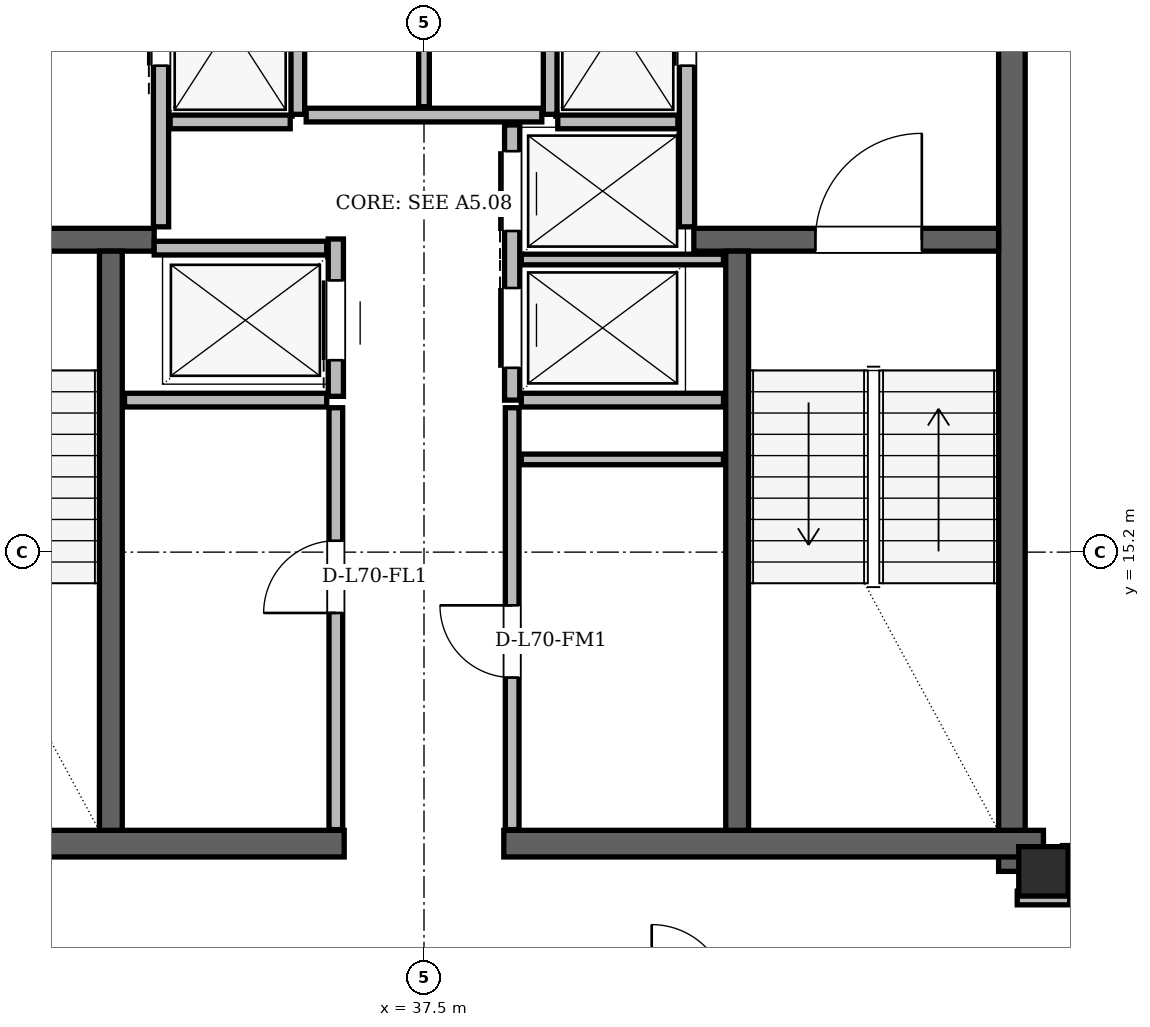
"""IFC4 building model, lengths in metres.
Left out: names, types, materials, properties, quantities, classifications, styles, units other than length and angle.
Written with IfcOpenShell. Run it as: python <this file> out.ifc"""

import sys

from ifc_helpers import new_model, si_unit, direction, frame, frame_2d, origin, origin_2d, place, context, subcontext, project, spatial, rectangle, hollow_rectangle, extrude, element, fill, save


model = new_model("IFC4")
c1 = context("Model", 3, precision=1e-05, world=origin(), true_north=direction((0.0, 1.0)))
c2 = subcontext(c1, "Body", "Model", "MODEL_VIEW")
j1 = project(units=[si_unit("LENGTHUNIT", "METRE"), si_unit("PLANEANGLEUNIT", "RADIAN")], contexts=[c1])
p1 = place(None, origin())
s1 = spatial("IfcSite", under=j1, at=p1, CompositionType="ELEMENT")
p2 = place(p1, origin())
s2 = spatial("IfcBuilding", under=s1, at=p2, CompositionType="ELEMENT")
p3 = place(p2, frame((0.0, 0.0, 265.5)))
s3 = spatial("IfcBuildingStorey", under=s2, at=p3, CompositionType="ELEMENT", Elevation=265.5)
p4 = place(p3, frame((45.65, 11.0, 0.0), z_axis=(0.0, 0.0, 1.0), x_axis=(1.0, 0.0, 0.0)))
e1 = element("IfcColumn", 1, at=p4, inside=s3, PredefinedType="COLUMN", context=c2, shape_type="SweptSolid", body=[
    extrude(hollow_rectangle(XDim=0.65, YDim=0.65, WallThickness=0.05, at=origin_2d()), origin(), (0.0, 0.0, 1.0), 3.9),
])
p5 = place(p3, frame((45.235, 11.0, 0.0), z_axis=(0.0, 0.0, 1.0), x_axis=(0.0, 1.0, 0.0)))
e2 = element("IfcWall", 2, at=p5, inside=s3, PredefinedType="SHEAR", context=c2, shape_type="SweptSolid", body=[
    extrude(rectangle(XDim=13.3, YDim=0.35, at=frame_2d((6.65, 0.0))), origin(), (0.0, 0.0, 1.0), 3.68),
])
for number, where, z_axis, x_axis in (
    (3, (29.35, 11.365, 0.0), (0.0, 0.0, 1.0), (1.0, 0.0, 0.0)),
    (4, (38.55, 11.365, 0.0), (0.0, 0.0, 1.0), (1.0, 0.0, 0.0)),
):
    element("IfcWall", number, at=place(p3, frame(where, z_axis=z_axis, x_axis=x_axis)), inside=s3, PredefinedType="SHEAR", context=c2, shape_type="SweptSolid", body=[
        extrude(rectangle(XDim=7.1, YDim=0.35, at=frame_2d((3.55, 0.0))), origin(), (0.0, 0.0, 1.0), 3.68),
    ])
p6 = place(p3, frame((29.94, 19.31, 0.0), z_axis=(0.0, 0.0, 1.0), x_axis=(1.0, 0.0, 0.0)))
e5 = element("IfcWall", 5, at=p6, inside=s3, PredefinedType="SHEAR", context=c2, shape_type="SweptSolid", body=[
    extrude(rectangle(XDim=4.01, YDim=0.3, at=frame_2d((2.005, 0.0))), origin(), (0.0, 0.0, 1.0), 3.68),
])
p7 = place(p6, frame((1.01, 0.0, 0.0)))
e6 = element("IfcOpeningElement", 6, at=p7, cuts=e5, PredefinedType="OPENING", context=c2, shape_type="SweptSolid", body=[
    extrude(rectangle(XDim=1.4, YDim=2.2, at=frame_2d((0.7, 1.1))), frame((0.0, 0.15, 0.0), z_axis=(0.0, -1.0, 0.0), x_axis=(1.0, 0.0, 0.0)), (0.0, 0.0, 1.0), 0.3),
])
p8 = place(p3, frame((41.05, 19.31, 0.0), z_axis=(0.0, 0.0, 1.0), x_axis=(1.0, 0.0, 0.0)))
e7 = element("IfcWall", 7, at=p8, inside=s3, PredefinedType="SHEAR", context=c2, shape_type="SweptSolid", body=[
    extrude(rectangle(XDim=4.01, YDim=0.3, at=frame_2d((2.005, 0.0))), origin(), (0.0, 0.0, 1.0), 3.68),
])
p9 = place(p8, frame((1.6, 0.0, 0.0)))
e8 = element("IfcOpeningElement", 8, at=p9, cuts=e7, PredefinedType="OPENING", context=c2, shape_type="SweptSolid", body=[
    extrude(rectangle(XDim=1.4, YDim=2.2, at=frame_2d((0.7, 1.1))), frame((0.0, 0.15, 0.0), z_axis=(0.0, -1.0, 0.0), x_axis=(1.0, 0.0, 0.0)), (0.0, 0.0, 1.0), 0.3),
])
for number, where, z_axis, x_axis in (
    (9, (33.38, 11.54, 0.0), (0.0, 0.0, 1.0), (0.0, 1.0, 0.0)),
    (10, (41.62, 11.54, 0.0), (0.0, 0.0, 1.0), (0.0, 1.0, 0.0)),
):
    element("IfcWall", number, at=place(p3, frame(where, z_axis=z_axis, x_axis=x_axis)), inside=s3, PredefinedType="SHEAR", context=c2, shape_type="SweptSolid", body=[
        extrude(rectangle(XDim=7.62, YDim=0.3, at=frame_2d((3.81, 0.0))), origin(), (0.0, 0.0, 1.0), 3.68),
    ])
p10 = place(p3, frame((35.012, 43.042, 0.0), z_axis=(0.0, 0.0, 1.0), x_axis=(-0.49999932964, -0.866025790817, 0.0)))
e11 = element("IfcWall", 11, at=p10, inside=s3, PredefinedType="SOLIDWALL", context=c2, shape_type="SweptSolid", body=[
    extrude(rectangle(XDim=37.248, YDim=0.29, at=frame_2d((18.624, 0.0))), origin(), (0.0, 0.0, 1.0), 3.058),
])
p11 = place(p10, frame((3.639, 0.0, 0.0)))
e12 = element("IfcOpeningElement", 12, at=p11, cuts=e11, PredefinedType="OPENING", context=c2, shape_type="SweptSolid", body=[
    extrude(rectangle(XDim=1.5, YDim=2.2, at=frame_2d((0.75, 1.1))), frame((0.0, 0.145, 0.0), z_axis=(0.0, -1.0, 0.0), x_axis=(1.0, 0.0, 0.0)), (0.0, 0.0, 1.0), 0.29),
])
p12 = place(p10, frame((27.504, 0.0, 0.0)))
e13 = element("IfcOpeningElement", 13, at=p12, cuts=e11, PredefinedType="OPENING", context=c2, shape_type="SweptSolid", body=[
    extrude(rectangle(XDim=1.5, YDim=2.2, at=frame_2d((0.75, 1.1))), frame((0.0, 0.145, 0.0), z_axis=(0.0, -1.0, 0.0), x_axis=(1.0, 0.0, 0.0)), (0.0, 0.0, 1.0), 0.29),
])
p13 = place(p10, frame((35.135, 0.0, 0.85)))
e14 = element("IfcOpeningElement", 14, at=p13, cuts=e11, PredefinedType="OPENING", context=c2, shape_type="SweptSolid", body=[
    extrude(rectangle(XDim=1.2, YDim=1.48, at=frame_2d((0.6, 0.74))), frame((0.0, 0.145, 0.0), z_axis=(0.0, -1.0, 0.0), x_axis=(1.0, 0.0, 0.0)), (0.0, 0.0, 1.0), 0.29),
])
p14 = place(p10, frame((32.321, 0.0, 0.85)))
e15 = element("IfcOpeningElement", 15, at=p14, cuts=e11, PredefinedType="OPENING", context=c2, shape_type="SweptSolid", body=[
    extrude(rectangle(XDim=2.0, YDim=1.8, at=frame_2d((1.0, 0.9))), frame((0.0, 0.145, 0.0), z_axis=(0.0, -1.0, 0.0), x_axis=(1.0, 0.0, 0.0)), (0.0, 0.0, 1.0), 0.29),
])
p15 = place(p10, frame((12.691, 0.0, 0.85)))
e16 = element("IfcOpeningElement", 16, at=p15, cuts=e11, PredefinedType="OPENING", context=c2, shape_type="SweptSolid", body=[
    extrude(rectangle(XDim=2.0, YDim=1.8, at=frame_2d((1.0, 0.9))), frame((0.0, 0.145, 0.0), z_axis=(0.0, -1.0, 0.0), x_axis=(1.0, 0.0, 0.0)), (0.0, 0.0, 1.0), 0.29),
])
p16 = place(p10, frame((21.019, 0.0, 0.85)))
e17 = element("IfcOpeningElement", 17, at=p16, cuts=e11, PredefinedType="OPENING", context=c2, shape_type="SweptSolid", body=[
    extrude(rectangle(XDim=1.4, YDim=1.6, at=frame_2d((0.7, 0.8))), frame((0.0, 0.145, 0.0), z_axis=(0.0, -1.0, 0.0), x_axis=(1.0, 0.0, 0.0)), (0.0, 0.0, 1.0), 0.29),
])
p17 = place(p10, frame((1.529, 0.0, 0.85)))
e18 = element("IfcOpeningElement", 18, at=p17, cuts=e11, PredefinedType="OPENING", context=c2, shape_type="SweptSolid", body=[
    extrude(rectangle(XDim=1.2, YDim=1.48, at=frame_2d((0.6, 0.74))), frame((0.0, 0.145, 0.0), z_axis=(0.0, -1.0, 0.0), x_axis=(1.0, 0.0, 0.0)), (0.0, 0.0, 1.0), 0.29),
])
p18 = place(p10, frame((7.904, 0.0, 0.85)))
e19 = element("IfcOpeningElement", 19, at=p18, cuts=e11, PredefinedType="OPENING", context=c2, shape_type="SweptSolid", body=[
    extrude(rectangle(XDim=2.0, YDim=1.8, at=frame_2d((1.0, 0.9))), frame((0.0, 0.145, 0.0), z_axis=(0.0, -1.0, 0.0), x_axis=(1.0, 0.0, 0.0)), (0.0, 0.0, 1.0), 0.29),
])
p19 = place(p3, frame((34.04, 19.48, 0.0), z_axis=(0.0, 0.0, 1.0), x_axis=(0.0, 1.0, 0.0)))
e20 = element("IfcWall", 20, at=p19, inside=s3, PredefinedType="PARTITIONING", context=c2, shape_type="SweptSolid", body=[
    extrude(rectangle(XDim=4.5, YDim=0.2, at=frame_2d((2.25, 0.0))), origin(), (0.0, 0.0, 1.0), 3.68),
])
p20 = place(p19, frame((2.12, 0.0, 0.0)))
e21 = element("IfcOpeningElement", 21, at=p20, cuts=e20, PredefinedType="OPENING", context=c2, shape_type="SweptSolid", body=[
    extrude(rectangle(XDim=1.1, YDim=2.2, at=frame_2d((0.55, 1.1))), frame((0.0, 0.1, 0.0), z_axis=(0.0, -1.0, 0.0), x_axis=(1.0, 0.0, 0.0)), (0.0, 0.0, 1.0), 0.2),
])
p21 = place(p3, frame((35.84, 20.96, 0.0), z_axis=(0.0, 0.0, 1.0), x_axis=(0.0, 1.0, 0.0)))
e22 = element("IfcWall", 22, at=p21, inside=s3, PredefinedType="PARTITIONING", context=c2, shape_type="SweptSolid", body=[
    extrude(rectangle(XDim=3.02, YDim=0.18, at=frame_2d((1.51, 0.0))), origin(), (0.0, 0.0, 1.0), 3.68),
])
p22 = place(p3, frame((34.16, 20.86, 0.0), z_axis=(0.0, 0.0, 1.0), x_axis=(1.0, 0.0, 0.0)))
e23 = element("IfcWall", 23, at=p22, inside=s3, PredefinedType="PARTITIONING", context=c2, shape_type="SweptSolid", body=[
    extrude(rectangle(XDim=1.58, YDim=0.18, at=frame_2d((0.79, 0.0))), origin(), (0.0, 0.0, 1.0), 3.68),
])
p23 = place(p3, frame((40.96, 19.48, 0.0), z_axis=(0.0, 0.0, 1.0), x_axis=(0.0, 1.0, 0.0)))
e24 = element("IfcWall", 24, at=p23, inside=s3, PredefinedType="PARTITIONING", context=c2, shape_type="SweptSolid", body=[
    extrude(rectangle(XDim=4.5, YDim=0.2, at=frame_2d((2.25, 0.0))), origin(), (0.0, 0.0, 1.0), 3.68),
])
p24 = place(p23, frame((2.12, 0.0, 0.0)))
e25 = element("IfcOpeningElement", 25, at=p24, cuts=e24, PredefinedType="OPENING", context=c2, shape_type="SweptSolid", body=[
    extrude(rectangle(XDim=1.1, YDim=2.2, at=frame_2d((0.55, 1.1))), frame((0.0, 0.1, 0.0), z_axis=(0.0, -1.0, 0.0), x_axis=(1.0, 0.0, 0.0)), (0.0, 0.0, 1.0), 0.2),
])
p25 = place(p3, frame((39.16, 20.96, 0.0), z_axis=(0.0, 0.0, 1.0), x_axis=(0.0, 1.0, 0.0)))
e26 = element("IfcWall", 26, at=p25, inside=s3, PredefinedType="PARTITIONING", context=c2, shape_type="SweptSolid", body=[
    extrude(rectangle(XDim=3.02, YDim=0.18, at=frame_2d((1.51, 0.0))), origin(), (0.0, 0.0, 1.0), 3.68),
])
p26 = place(p3, frame((39.26, 20.86, 0.0), z_axis=(0.0, 0.0, 1.0), x_axis=(1.0, 0.0, 0.0)))
e27 = element("IfcWall", 27, at=p26, inside=s3, PredefinedType="PARTITIONING", context=c2, shape_type="SweptSolid", body=[
    extrude(rectangle(XDim=1.58, YDim=0.18, at=frame_2d((0.79, 0.0))), origin(), (0.0, 0.0, 1.0), 3.68),
])
p27 = place(p3, frame((36.34, 17.25, 0.0), z_axis=(0.0, 0.0, 1.0), x_axis=(0.0, 1.0, 0.0)))
e28 = element("IfcWall", 28, at=p27, inside=s3, PredefinedType="PARTITIONING", context=c2, shape_type="SweptSolid", body=[
    extrude(rectangle(XDim=2.07, YDim=0.2, at=frame_2d((1.035, 0.0))), origin(), (0.0, 0.0, 1.0), 3.68),
])
p28 = place(p27, frame((0.475, 0.0, 0.0)))
e29 = element("IfcOpeningElement", 29, at=p28, cuts=e28, PredefinedType="OPENING", context=c2, shape_type="SweptSolid", body=[
    extrude(rectangle(XDim=1.05, YDim=2.15, at=frame_2d((0.525, 1.075))), frame((0.0, 0.1, 0.0), z_axis=(0.0, -1.0, 0.0), x_axis=(1.0, 0.0, 0.0)), (0.0, 0.0, 1.0), 0.2),
])
p29 = place(p3, frame((33.95, 19.2, 0.0), z_axis=(0.0, 0.0, 1.0), x_axis=(1.0, 0.0, 0.0)))
e30 = element("IfcWall", 30, at=p29, inside=s3, PredefinedType="PARTITIONING", context=c2, shape_type="SweptSolid", body=[
    extrude(rectangle(XDim=2.27, YDim=0.18, at=frame_2d((1.135, 0.0))), origin(), (0.0, 0.0, 1.0), 3.68),
])
p30 = place(p3, frame((33.56, 17.2, 0.0), z_axis=(0.0, 0.0, 1.0), x_axis=(1.0, 0.0, 0.0)))
e31 = element("IfcWall", 31, at=p30, inside=s3, PredefinedType="PARTITIONING", context=c2, shape_type="SweptSolid", body=[
    extrude(rectangle(XDim=2.66, YDim=0.18, at=frame_2d((1.33, 0.0))), origin(), (0.0, 0.0, 1.0), 3.68),
])
p31 = place(p3, frame((36.34, 11.55, 0.0), z_axis=(0.0, 0.0, 1.0), x_axis=(0.0, 1.0, 0.0)))
e32 = element("IfcWall", 32, at=p31, inside=s3, PredefinedType="PARTITIONING", context=c2, shape_type="SweptSolid", body=[
    extrude(rectangle(XDim=5.55, YDim=0.18, at=frame_2d((2.775, 0.0))), origin(), (0.0, 0.0, 1.0), 3.68),
])
p32 = place(p31, frame((2.85, 0.0, 0.0)))
e33 = element("IfcOpeningElement", 33, at=p32, cuts=e32, PredefinedType="OPENING", context=c2, shape_type="SweptSolid", body=[
    extrude(rectangle(XDim=0.95, YDim=2.1, at=frame_2d((0.475, 1.05))), frame((0.0, 0.09, 0.0), z_axis=(0.0, -1.0, 0.0), x_axis=(1.0, 0.0, 0.0)), (0.0, 0.0, 1.0), 0.18),
])
p33 = place(p3, frame((38.66, 17.2, 0.0), z_axis=(0.0, 0.0, 1.0), x_axis=(0.0, 1.0, 0.0)))
e34 = element("IfcWall", 34, at=p33, inside=s3, PredefinedType="PARTITIONING", context=c2, shape_type="SweptSolid", body=[
    extrude(rectangle(XDim=3.62, YDim=0.2, at=frame_2d((1.81, 0.0))), origin(), (0.0, 0.0, 1.0), 3.68),
])
p34 = place(p33, frame((0.425, 0.0, 0.0)))
e35 = element("IfcOpeningElement", 35, at=p34, cuts=e34, PredefinedType="OPENING", context=c2, shape_type="SweptSolid", body=[
    extrude(rectangle(XDim=1.05, YDim=2.15, at=frame_2d((0.525, 1.075))), frame((0.0, 0.1, 0.0), z_axis=(0.0, -1.0, 0.0), x_axis=(1.0, 0.0, 0.0)), (0.0, 0.0, 1.0), 0.2),
])
p35 = place(p33, frame((2.225, 0.0, 0.0)))
e36 = element("IfcOpeningElement", 36, at=p35, cuts=e34, PredefinedType="OPENING", context=c2, shape_type="SweptSolid", body=[
    extrude(rectangle(XDim=1.05, YDim=2.15, at=frame_2d((0.525, 1.075))), frame((0.0, 0.1, 0.0), z_axis=(0.0, -1.0, 0.0), x_axis=(1.0, 0.0, 0.0)), (0.0, 0.0, 1.0), 0.2),
])
p36 = place(p3, frame((38.78, 17.2, 0.0), z_axis=(0.0, 0.0, 1.0), x_axis=(1.0, 0.0, 0.0)))
e37 = element("IfcWall", 37, at=p36, inside=s3, PredefinedType="PARTITIONING", context=c2, shape_type="SweptSolid", body=[
    extrude(rectangle(XDim=2.66, YDim=0.18, at=frame_2d((1.33, 0.0))), origin(), (0.0, 0.0, 1.0), 3.68),
])
p37 = place(p3, frame((38.78, 19.05, 0.0), z_axis=(0.0, 0.0, 1.0), x_axis=(1.0, 0.0, 0.0)))
e38 = element("IfcWall", 38, at=p37, inside=s3, PredefinedType="PARTITIONING", context=c2, shape_type="SweptSolid", body=[
    extrude(rectangle(XDim=2.66, YDim=0.14, at=frame_2d((1.33, 0.0))), origin(), (0.0, 0.0, 1.0), 3.68),
])
p38 = place(p3, frame((38.66, 11.55, 0.0), z_axis=(0.0, 0.0, 1.0), x_axis=(0.0, 1.0, 0.0)))
e39 = element("IfcWall", 39, at=p38, inside=s3, PredefinedType="PARTITIONING", context=c2, shape_type="SweptSolid", body=[
    extrude(rectangle(XDim=5.55, YDim=0.18, at=frame_2d((2.775, 0.0))), origin(), (0.0, 0.0, 1.0), 3.68),
])
p39 = place(p38, frame((2.0, 0.0, 0.0)))
e40 = element("IfcOpeningElement", 40, at=p39, cuts=e39, PredefinedType="OPENING", context=c2, shape_type="SweptSolid", body=[
    extrude(rectangle(XDim=0.95, YDim=2.1, at=frame_2d((0.475, 1.05))), frame((0.0, 0.09, 0.0), z_axis=(0.0, -1.0, 0.0), x_axis=(1.0, 0.0, 0.0)), (0.0, 0.0, 1.0), 0.18),
])
p40 = place(p3, frame((38.78, 16.42, 0.0), z_axis=(0.0, 0.0, 1.0), x_axis=(1.0, 0.0, 0.0)))
e41 = element("IfcWall", 41, at=p40, inside=s3, PredefinedType="PARTITIONING", context=c2, shape_type="SweptSolid", body=[
    extrude(rectangle(XDim=2.66, YDim=0.14, at=frame_2d((1.33, 0.0))), origin(), (0.0, 0.0, 1.0), 3.68),
])
p41 = place(p3, frame((35.95, 20.95, 0.0), z_axis=(0.0, 0.0, 1.0), x_axis=(1.0, 0.0, 0.0)))
e42 = element("IfcWall", 42, at=p41, inside=s3, PredefinedType="PARTITIONING", context=c2, shape_type="SweptSolid", body=[
    extrude(rectangle(XDim=3.1, YDim=0.18, at=frame_2d((1.55, 0.0))), origin(), (0.0, 0.0, 1.0), 3.68),
])
p42 = place(p3, frame((37.5, 21.06, 0.0), z_axis=(0.0, 0.0, 1.0), x_axis=(0.0, 1.0, 0.0)))
e43 = element("IfcWall", 43, at=p42, inside=s3, PredefinedType="PARTITIONING", context=c2, shape_type="SweptSolid", body=[
    extrude(rectangle(XDim=2.92, YDim=0.14, at=frame_2d((1.46, 0.0))), origin(), (0.0, 0.0, 1.0), 3.68),
])
p43 = place(p3, frame((45.305, 10.65, 0.0), z_axis=(0.0, 0.0, 1.0), x_axis=(1.0, 0.0, 0.0)))
e44 = element("IfcWall", 44, at=p43, inside=s3, PredefinedType="PARTITIONING", context=c2, shape_type="SweptSolid", body=[
    extrude(rectangle(XDim=0.69, YDim=0.18, at=frame_2d((0.345, 0.0))), origin(), (0.0, 0.0, 1.0), 3.68),
])
p44 = place(p3, frame((45.99, 10.95, 0.0), z_axis=(0.0, 0.0, 1.0), x_axis=(0.0, 1.0, 0.0)))
e45 = element("IfcWall", 45, at=p44, inside=s3, PredefinedType="PARTITIONING", context=c2, shape_type="SweptSolid", body=[
    extrude(rectangle(XDim=0.39, YDim=0.18, at=frame_2d((0.195, 0.0))), origin(), (0.0, 0.0, 1.0), 3.68),
])
p45 = place(p32, origin())
e46 = element("IfcDoor", 46, at=p45, inside=s3, OperationType="SINGLE_SWING_LEFT", PredefinedType="DOOR", context=c2, shape_type="SweptSolid", body=[
    extrude(rectangle(XDim=0.95, YDim=2.1, at=frame_2d((0.475, 1.05))), frame((0.0, 0.025, 0.0), z_axis=(0.0, -1.0, 0.0), x_axis=(1.0, 0.0, 0.0)), (0.0, 0.0, 1.0), 0.05),
])
fill(e33, e46)
p46 = place(p39, origin())
e47 = element("IfcDoor", 47, at=p46, inside=s3, OperationType="SINGLE_SWING_RIGHT", PredefinedType="DOOR", context=c2, shape_type="SweptSolid", body=[
    extrude(rectangle(XDim=0.95, YDim=2.1, at=frame_2d((0.475, 1.05))), frame((0.0, 0.025, 0.0), z_axis=(0.0, -1.0, 0.0), x_axis=(1.0, 0.0, 0.0)), (0.0, 0.0, 1.0), 0.05),
])
fill(e40, e47)
p47 = place(p20, origin())
e48 = element("IfcDoor", 48, at=p47, inside=s3, OperationType="SLIDING_TO_LEFT", PredefinedType="DOOR", context=c2, shape_type="SweptSolid", body=[
    extrude(rectangle(XDim=1.1, YDim=2.2, at=frame_2d((0.55, 1.1))), frame((0.0, 0.025, 0.0), z_axis=(0.0, -1.0, 0.0), x_axis=(1.0, 0.0, 0.0)), (0.0, 0.0, 1.0), 0.05),
])
fill(e21, e48)
p48 = place(p24, origin())
e49 = element("IfcDoor", 49, at=p48, inside=s3, OperationType="SLIDING_TO_RIGHT", PredefinedType="DOOR", context=c2, shape_type="SweptSolid", body=[
    extrude(rectangle(XDim=1.1, YDim=2.2, at=frame_2d((0.55, 1.1))), frame((0.0, 0.025, 0.0), z_axis=(0.0, -1.0, 0.0), x_axis=(1.0, 0.0, 0.0)), (0.0, 0.0, 1.0), 0.05),
])
fill(e25, e49)
p49 = place(p28, origin())
e50 = element("IfcDoor", 50, at=p49, inside=s3, OperationType="SLIDING_TO_LEFT", PredefinedType="DOOR", context=c2, shape_type="SweptSolid", body=[
    extrude(rectangle(XDim=1.05, YDim=2.15, at=frame_2d((0.525, 1.075))), frame((0.0, 0.025, 0.0), z_axis=(0.0, -1.0, 0.0), x_axis=(1.0, 0.0, 0.0)), (0.0, 0.0, 1.0), 0.05),
])
fill(e29, e50)
p50 = place(p34, origin())
e51 = element("IfcDoor", 51, at=p50, inside=s3, OperationType="SLIDING_TO_RIGHT", PredefinedType="DOOR", context=c2, shape_type="SweptSolid", body=[
    extrude(rectangle(XDim=1.05, YDim=2.15, at=frame_2d((0.525, 1.075))), frame((0.0, 0.025, 0.0), z_axis=(0.0, -1.0, 0.0), x_axis=(1.0, 0.0, 0.0)), (0.0, 0.0, 1.0), 0.05),
])
fill(e35, e51)
p51 = place(p35, origin())
e52 = element("IfcDoor", 52, at=p51, inside=s3, OperationType="SLIDING_TO_LEFT", PredefinedType="DOOR", context=c2, shape_type="SweptSolid", body=[
    extrude(rectangle(XDim=1.05, YDim=2.15, at=frame_2d((0.525, 1.075))), frame((0.0, 0.025, 0.0), z_axis=(0.0, -1.0, 0.0), x_axis=(1.0, 0.0, 0.0)), (0.0, 0.0, 1.0), 0.05),
])
fill(e36, e52)
p52 = place(p9, origin())
e53 = element("IfcDoor", 53, at=p52, inside=s3, OperationType="SINGLE_SWING_RIGHT", PredefinedType="DOOR", context=c2, shape_type="SweptSolid", body=[
    extrude(rectangle(XDim=1.4, YDim=2.2, at=frame_2d((0.7, 1.1))), frame((0.0, 0.025, 0.0), z_axis=(0.0, -1.0, 0.0), x_axis=(1.0, 0.0, 0.0)), (0.0, 0.0, 1.0), 0.05),
])
fill(e8, e53)
save(model, sys.argv[1])
